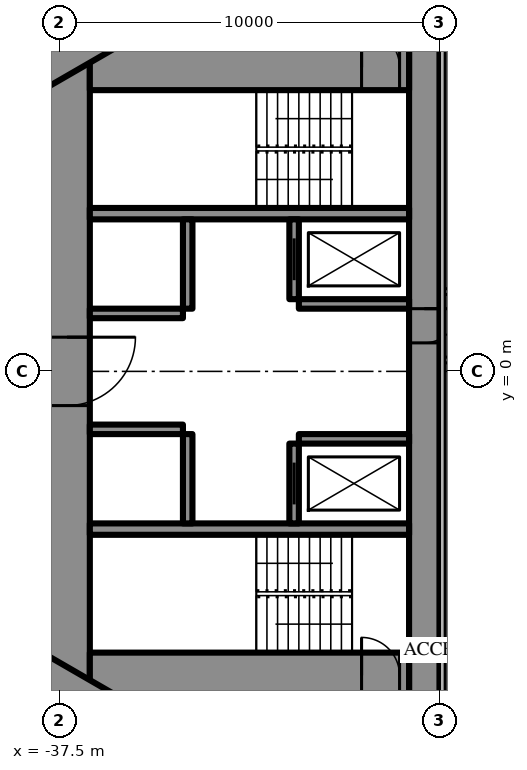
"""IFC4 building model, lengths in metres.
Left out: names, types, materials, properties, quantities, classifications, styles, units other than length and angle.
Written with IfcOpenShell. Run it as: python <this file> out.ifc"""

import sys

from ifc_helpers import new_model, si_unit, direction, frame, frame_2d, origin, place, context, subcontext, project, spatial, rectangle, extrude, element, fill, save


model = new_model("IFC4")
c1 = context("Model", 3, precision=1e-05, world=origin(), true_north=direction((0.0, 1.0)))
c2 = subcontext(c1, "Body", "Model", "MODEL_VIEW")
j1 = project(units=[si_unit("LENGTHUNIT", "METRE"), si_unit("PLANEANGLEUNIT", "RADIAN")], contexts=[c1])
p1 = place(None, origin())
s1 = spatial("IfcSite", under=j1, at=p1, CompositionType="ELEMENT")
p2 = place(p1, origin())
s2 = spatial("IfcBuilding", under=s1, at=p2, CompositionType="ELEMENT")
p3 = place(p2, frame((0.0, 0.0, 222.5)))
s3 = spatial("IfcBuildingStorey", under=s2, at=p3, CompositionType="ELEMENT", Elevation=222.5)
p4 = place(p3, frame((-27.9, 8.6, 0.0), z_axis=(0.0, 0.0, 1.0), x_axis=(0.0, -1.0, 0.0)))
e1 = element("IfcWall", 1, at=p4, inside=s3, PredefinedType="SHEAR", context=c2, shape_type="SweptSolid", body=[
    extrude(rectangle(XDim=17.2, YDim=0.8, at=frame_2d((8.6, 0.0))), origin(), (0.0, 0.0, 1.0), 3.6),
])
p5 = place(p4, frame((6.95, 0.0, 0.0)))
e2 = element("IfcOpeningElement", 2, at=p5, cuts=e1, PredefinedType="OPENING", context=c2, shape_type="SweptSolid", body=[
    extrude(rectangle(XDim=0.9, YDim=2.2, at=frame_2d((0.45, 1.1))), frame((0.0, 0.41, 0.0), z_axis=(0.0, -1.0, 0.0), x_axis=(1.0, 0.0, 0.0)), (0.0, 0.0, 1.0), 0.82),
])
p6 = place(p3, frame((-37.3, 8.6, 0.0), z_axis=(0.0, 0.0, 1.0), x_axis=(0.0, -1.0, 0.0)))
e3 = element("IfcWall", 3, at=p6, inside=s3, PredefinedType="SHEAR", context=c2, shape_type="SweptSolid", body=[
    extrude(rectangle(XDim=17.2, YDim=1.2, at=frame_2d((8.6, 0.0))), origin(), (0.0, 0.0, 1.0), 3.6),
])
p7 = place(p6, frame((7.7, 0.0, 0.0)))
e4 = element("IfcOpeningElement", 4, at=p7, cuts=e3, PredefinedType="OPENING", context=c2, shape_type="SweptSolid", body=[
    extrude(rectangle(XDim=1.8, YDim=2.2, at=frame_2d((0.9, 1.1))), frame((0.0, 0.61, 0.0), z_axis=(0.0, -1.0, 0.0), x_axis=(1.0, 0.0, 0.0)), (0.0, 0.0, 1.0), 1.22),
])
p8 = place(p3, frame((-28.3, 8.0, 0.0), z_axis=(0.0, 0.0, 1.0), x_axis=(-1.0, 0.0, 0.0)))
e5 = element("IfcWall", 5, at=p8, inside=s3, PredefinedType="SHEAR", context=c2, shape_type="SweptSolid", body=[
    extrude(rectangle(XDim=8.4, YDim=1.2, at=frame_2d((4.2, 0.0))), origin(), (0.0, 0.0, 1.0), 3.6),
])
p9 = place(p8, frame((0.25, 0.0, 0.0)))
e6 = element("IfcOpeningElement", 6, at=p9, cuts=e5, PredefinedType="OPENING", context=c2, shape_type="SweptSolid", body=[
    extrude(rectangle(XDim=1.0, YDim=2.2, at=frame_2d((0.5, 1.1))), frame((0.0, 0.61, 0.0), z_axis=(0.0, -1.0, 0.0), x_axis=(1.0, 0.0, 0.0)), (0.0, 0.0, 1.0), 1.22),
])
p10 = place(p3, frame((-28.3, -8.0, 0.0), z_axis=(0.0, 0.0, 1.0), x_axis=(-1.0, 0.0, 0.0)))
e7 = element("IfcWall", 7, at=p10, inside=s3, PredefinedType="SHEAR", context=c2, shape_type="SweptSolid", body=[
    extrude(rectangle(XDim=8.4, YDim=1.2, at=frame_2d((4.2, 0.0))), origin(), (0.0, 0.0, 1.0), 3.6),
])
p11 = place(p10, frame((0.25, 0.0, 0.0)))
e8 = element("IfcOpeningElement", 8, at=p11, cuts=e7, PredefinedType="OPENING", context=c2, shape_type="SweptSolid", body=[
    extrude(rectangle(XDim=1.0, YDim=2.2, at=frame_2d((0.5, 1.1))), frame((0.0, 0.61, 0.0), z_axis=(0.0, -1.0, 0.0), x_axis=(1.0, 0.0, 0.0)), (0.0, 0.0, 1.0), 1.22),
])
for number, where, z_axis, x_axis in (
    (9, (-28.3, 4.15, 0.0), (0.0, 0.0, 1.0), (-1.0, 0.0, 0.0)),
    (10, (-28.3, -4.15, 0.0), (0.0, 0.0, 1.0), (-1.0, 0.0, 0.0)),
):
    element("IfcWall", number, at=place(p3, frame(where, z_axis=z_axis, x_axis=x_axis)), inside=s3, PredefinedType="SHEAR", context=c2, shape_type="SweptSolid", body=[
        extrude(rectangle(XDim=8.4, YDim=0.3, at=frame_2d((4.2, 0.0))), origin(), (0.0, 0.0, 1.0), 3.6),
    ])
p12 = place(p3, frame((-31.325, 4.0, 0.0), z_axis=(0.0, 0.0, 1.0), x_axis=(0.0, -1.0, 0.0)))
e11 = element("IfcWall", 11, at=p12, inside=s3, PredefinedType="SHEAR", context=c2, shape_type="SweptSolid", body=[
    extrude(rectangle(XDim=2.1, YDim=0.25, at=frame_2d((1.05, 0.0))), origin(), (0.0, 0.0, 1.0), 3.6),
])
p13 = place(p12, frame((0.5, 0.0, 0.0)))
e12 = element("IfcOpeningElement", 12, at=p13, cuts=e11, PredefinedType="OPENING", context=c2, shape_type="SweptSolid", body=[
    extrude(rectangle(XDim=1.1, YDim=2.2, at=frame_2d((0.55, 1.1))), frame((0.0, 0.135, 0.0), z_axis=(0.0, -1.0, 0.0), x_axis=(1.0, 0.0, 0.0)), (0.0, 0.0, 1.0), 0.27),
])
p14 = place(p3, frame((-34.125, 4.0, 0.0), z_axis=(0.0, 0.0, 1.0), x_axis=(0.0, -1.0, 0.0)))
e13 = element("IfcWall", 13, at=p14, inside=s3, PredefinedType="SHEAR", context=c2, shape_type="SweptSolid", body=[
    extrude(rectangle(XDim=2.35, YDim=0.25, at=frame_2d((1.175, 0.0))), origin(), (0.0, 0.0, 1.0), 3.6),
])
p15 = place(p3, frame((-28.3, 1.775, 0.0), z_axis=(0.0, 0.0, 1.0), x_axis=(-1.0, 0.0, 0.0)))
e14 = element("IfcWall", 14, at=p15, inside=s3, PredefinedType="SHEAR", context=c2, shape_type="SweptSolid", body=[
    extrude(rectangle(XDim=2.9, YDim=0.25, at=frame_2d((1.45, 0.0))), origin(), (0.0, 0.0, 1.0), 3.6),
])
p16 = place(p3, frame((-34.25, 1.525, 0.0), z_axis=(0.0, 0.0, 1.0), x_axis=(-1.0, 0.0, 0.0)))
e15 = element("IfcWall", 15, at=p16, inside=s3, PredefinedType="SHEAR", context=c2, shape_type="SweptSolid", body=[
    extrude(rectangle(XDim=2.45, YDim=0.25, at=frame_2d((1.225, 0.0))), origin(), (0.0, 0.0, 1.0), 3.6),
])
p17 = place(p3, frame((-31.325, -1.9, 0.0), z_axis=(0.0, 0.0, 1.0), x_axis=(0.0, -1.0, 0.0)))
e16 = element("IfcWall", 16, at=p17, inside=s3, PredefinedType="SHEAR", context=c2, shape_type="SweptSolid", body=[
    extrude(rectangle(XDim=2.1, YDim=0.25, at=frame_2d((1.05, 0.0))), origin(), (0.0, 0.0, 1.0), 3.6),
])
p18 = place(p17, frame((0.5, 0.0, 0.0)))
e17 = element("IfcOpeningElement", 17, at=p18, cuts=e16, PredefinedType="OPENING", context=c2, shape_type="SweptSolid", body=[
    extrude(rectangle(XDim=1.1, YDim=2.2, at=frame_2d((0.55, 1.1))), frame((0.0, 0.135, 0.0), z_axis=(0.0, -1.0, 0.0), x_axis=(1.0, 0.0, 0.0)), (0.0, 0.0, 1.0), 0.27),
])
p19 = place(p3, frame((-34.125, -1.65, 0.0), z_axis=(0.0, 0.0, 1.0), x_axis=(0.0, -1.0, 0.0)))
e18 = element("IfcWall", 18, at=p19, inside=s3, PredefinedType="SHEAR", context=c2, shape_type="SweptSolid", body=[
    extrude(rectangle(XDim=2.35, YDim=0.25, at=frame_2d((1.175, 0.0))), origin(), (0.0, 0.0, 1.0), 3.6),
])
p20 = place(p3, frame((-28.3, -1.775, 0.0), z_axis=(0.0, 0.0, 1.0), x_axis=(-1.0, 0.0, 0.0)))
e19 = element("IfcWall", 19, at=p20, inside=s3, PredefinedType="SHEAR", context=c2, shape_type="SweptSolid", body=[
    extrude(rectangle(XDim=2.9, YDim=0.25, at=frame_2d((1.45, 0.0))), origin(), (0.0, 0.0, 1.0), 3.6),
])
p21 = place(p3, frame((-34.25, -1.525, 0.0), z_axis=(0.0, 0.0, 1.0), x_axis=(-1.0, 0.0, 0.0)))
e20 = element("IfcWall", 20, at=p21, inside=s3, PredefinedType="SHEAR", context=c2, shape_type="SweptSolid", body=[
    extrude(rectangle(XDim=2.45, YDim=0.25, at=frame_2d((1.225, 0.0))), origin(), (0.0, 0.0, 1.0), 3.6),
])
p22 = place(p3, frame((-27.2, 14.3, 0.0), z_axis=(0.0, 0.0, 1.0), x_axis=(-0.866026593062, -0.499997940104, 0.0)))
e21 = element("IfcWall", 21, at=p22, inside=s3, PredefinedType="SHEAR", context=c2, shape_type="SweptSolid", body=[
    extrude(rectangle(XDim=28.946, YDim=1.2, at=frame_2d((14.473, 0.0))), origin(), (0.0, 0.0, 1.0), 3.6),
])
p23 = place(p22, frame((4.6, 0.0, 0.0)))
e22 = element("IfcOpeningElement", 22, at=p23, cuts=e21, PredefinedType="OPENING", context=c2, shape_type="SweptSolid", body=[
    extrude(rectangle(XDim=1.0, YDim=2.2, at=frame_2d((0.5, 1.1))), frame((0.0, 0.61, 0.0), z_axis=(0.0, -1.0, 0.0), x_axis=(1.0, 0.0, 0.0)), (0.0, 0.0, 1.0), 1.22),
])
p24 = place(p22, frame((13.395, 0.0, 0.0)))
e23 = element("IfcOpeningElement", 23, at=p24, cuts=e21, PredefinedType="OPENING", context=c2, shape_type="SweptSolid", body=[
    extrude(rectangle(XDim=1.8, YDim=2.2, at=frame_2d((0.9, 1.1))), frame((0.0, 0.61, 0.0), z_axis=(0.0, -1.0, 0.0), x_axis=(1.0, 0.0, 0.0)), (0.0, 0.0, 1.0), 1.22),
])
p25 = place(p3, frame((-27.2, -14.3, 0.0), z_axis=(0.0, 0.0, 1.0), x_axis=(-0.866024021859, 0.500002393557, 0.0)))
e24 = element("IfcWall", 24, at=p25, inside=s3, PredefinedType="SHEAR", context=c2, shape_type="SweptSolid", body=[
    extrude(rectangle(XDim=27.907, YDim=1.2, at=frame_2d((13.954, 0.0))), origin(), (0.0, 0.0, 1.0), 3.6),
])
p26 = place(p25, frame((4.6, 0.0, 0.0)))
e25 = element("IfcOpeningElement", 25, at=p26, cuts=e24, PredefinedType="OPENING", context=c2, shape_type="SweptSolid", body=[
    extrude(rectangle(XDim=1.0, YDim=2.2, at=frame_2d((0.5, 1.1))), frame((0.0, 0.61, 0.0), z_axis=(0.0, -1.0, 0.0), x_axis=(1.0, 0.0, 0.0)), (0.0, 0.0, 1.0), 1.22),
])
p27 = place(p25, frame((13.395, 0.0, 0.0)))
e26 = element("IfcOpeningElement", 26, at=p27, cuts=e24, PredefinedType="OPENING", context=c2, shape_type="SweptSolid", body=[
    extrude(rectangle(XDim=1.8, YDim=2.2, at=frame_2d((0.9, 1.1))), frame((0.0, 0.61, 0.0), z_axis=(0.0, -1.0, 0.0), x_axis=(1.0, 0.0, 0.0)), (0.0, 0.0, 1.0), 1.22),
])
p28 = place(p3, frame((-28.737, 16.068, 0.0), z_axis=(0.0, 0.0, 1.0), x_axis=(-0.866026057212, -0.499998868229, 0.0)))
e27 = element("IfcWall", 27, at=p28, inside=s3, PredefinedType="PARTITIONING", context=c2, shape_type="SweptSolid", body=[
    extrude(rectangle(XDim=32.137, YDim=0.2, at=frame_2d((16.068, 0.0))), origin(), (0.0, 0.0, 1.0), 3.35),
])
p29 = place(p28, frame((1.08, 0.0, 0.0)))
e28 = element("IfcOpeningElement", 28, at=p29, cuts=e27, PredefinedType="OPENING", context=c2, shape_type="SweptSolid", body=[
    extrude(rectangle(XDim=1.8, YDim=2.03, at=frame_2d((0.9, 1.015))), frame((0.0, 0.11, 0.0), z_axis=(0.0, -1.0, 0.0), x_axis=(1.0, 0.0, 0.0)), (0.0, 0.0, 1.0), 0.22),
])
p30 = place(p28, frame((6.86, 0.0, 0.0)))
e29 = element("IfcOpeningElement", 29, at=p30, cuts=e27, PredefinedType="OPENING", context=c2, shape_type="SweptSolid", body=[
    extrude(rectangle(XDim=1.0, YDim=2.2, at=frame_2d((0.5, 1.1))), frame((0.0, 0.11, 0.0), z_axis=(0.0, -1.0, 0.0), x_axis=(1.0, 0.0, 0.0)), (0.0, 0.0, 1.0), 0.22),
])
p31 = place(p28, frame((16.418, 0.0, 0.0)))
e30 = element("IfcOpeningElement", 30, at=p31, cuts=e27, PredefinedType="OPENING", context=c2, shape_type="SweptSolid", body=[
    extrude(rectangle(XDim=0.95, YDim=2.2, at=frame_2d((0.475, 1.1))), frame((0.0, 0.11, 0.0), z_axis=(0.0, -1.0, 0.0), x_axis=(1.0, 0.0, 0.0)), (0.0, 0.0, 1.0), 0.22),
])
p32 = place(p28, frame((20.567, 0.0, 0.0)))
e31 = element("IfcOpeningElement", 31, at=p32, cuts=e27, PredefinedType="OPENING", context=c2, shape_type="SweptSolid", body=[
    extrude(rectangle(XDim=0.95, YDim=2.2, at=frame_2d((0.475, 1.1))), frame((0.0, 0.11, 0.0), z_axis=(0.0, -1.0, 0.0), x_axis=(1.0, 0.0, 0.0)), (0.0, 0.0, 1.0), 0.22),
])
p33 = place(p28, frame((27.065, 0.0, 0.0)))
e32 = element("IfcOpeningElement", 32, at=p33, cuts=e27, PredefinedType="OPENING", context=c2, shape_type="SweptSolid", body=[
    extrude(rectangle(XDim=0.95, YDim=2.2, at=frame_2d((0.475, 1.1))), frame((0.0, 0.11, 0.0), z_axis=(0.0, -1.0, 0.0), x_axis=(1.0, 0.0, 0.0)), (0.0, 0.0, 1.0), 0.22),
])
p34 = place(p3, frame((-27.5, 0.3, 0.0), z_axis=(0.0, 0.0, 1.0), x_axis=(1.0, 0.0, 0.0)))
e33 = element("IfcWall", 33, at=p34, inside=s3, PredefinedType="PARTITIONING", context=c2, shape_type="SweptSolid", body=[
    extrude(rectangle(XDim=55.0, YDim=0.15, at=frame_2d((27.5, 0.0))), origin(), (0.0, 0.0, 1.0), 2.4),
])
p35 = place(p34, frame((1.575, 0.0, 0.0)))
e34 = element("IfcOpeningElement", 34, at=p35, cuts=e33, PredefinedType="OPENING", context=c2, shape_type="SweptSolid", body=[
    extrude(rectangle(XDim=1.0, YDim=2.2, at=frame_2d((0.5, 1.1))), frame((0.0, 0.085, 0.0), z_axis=(0.0, -1.0, 0.0), x_axis=(1.0, 0.0, 0.0)), (0.0, 0.0, 1.0), 0.17),
])
p36 = place(p34, frame((8.525, 0.0, 0.0)))
e35 = element("IfcOpeningElement", 35, at=p36, cuts=e33, PredefinedType="OPENING", context=c2, shape_type="SweptSolid", body=[
    extrude(rectangle(XDim=1.05, YDim=2.4, at=frame_2d((0.525, 1.2))), frame((0.0, 0.085, 0.0), z_axis=(0.0, -1.0, 0.0), x_axis=(1.0, 0.0, 0.0)), (0.0, 0.0, 1.0), 0.17),
])
p37 = place(p34, frame((14.025, 0.0, 0.0)))
e36 = element("IfcOpeningElement", 36, at=p37, cuts=e33, PredefinedType="OPENING", context=c2, shape_type="SweptSolid", body=[
    extrude(rectangle(XDim=1.05, YDim=2.4, at=frame_2d((0.525, 1.2))), frame((0.0, 0.085, 0.0), z_axis=(0.0, -1.0, 0.0), x_axis=(1.0, 0.0, 0.0)), (0.0, 0.0, 1.0), 0.17),
])
p38 = place(p34, frame((19.525, 0.0, 0.0)))
e37 = element("IfcOpeningElement", 37, at=p38, cuts=e33, PredefinedType="OPENING", context=c2, shape_type="SweptSolid", body=[
    extrude(rectangle(XDim=1.05, YDim=2.4, at=frame_2d((0.525, 1.2))), frame((0.0, 0.085, 0.0), z_axis=(0.0, -1.0, 0.0), x_axis=(1.0, 0.0, 0.0)), (0.0, 0.0, 1.0), 0.17),
])
p39 = place(p34, frame((25.025, 0.0, 0.0)))
e38 = element("IfcOpeningElement", 38, at=p39, cuts=e33, PredefinedType="OPENING", context=c2, shape_type="SweptSolid", body=[
    extrude(rectangle(XDim=1.05, YDim=2.4, at=frame_2d((0.525, 1.2))), frame((0.0, 0.085, 0.0), z_axis=(0.0, -1.0, 0.0), x_axis=(1.0, 0.0, 0.0)), (0.0, 0.0, 1.0), 0.17),
])
p40 = place(p34, frame((30.525, 0.0, 0.0)))
e39 = element("IfcOpeningElement", 39, at=p40, cuts=e33, PredefinedType="OPENING", context=c2, shape_type="SweptSolid", body=[
    extrude(rectangle(XDim=1.05, YDim=2.4, at=frame_2d((0.525, 1.2))), frame((0.0, 0.085, 0.0), z_axis=(0.0, -1.0, 0.0), x_axis=(1.0, 0.0, 0.0)), (0.0, 0.0, 1.0), 0.17),
])
p41 = place(p34, frame((36.025, 0.0, 0.0)))
e40 = element("IfcOpeningElement", 40, at=p41, cuts=e33, PredefinedType="OPENING", context=c2, shape_type="SweptSolid", body=[
    extrude(rectangle(XDim=1.05, YDim=2.4, at=frame_2d((0.525, 1.2))), frame((0.0, 0.085, 0.0), z_axis=(0.0, -1.0, 0.0), x_axis=(1.0, 0.0, 0.0)), (0.0, 0.0, 1.0), 0.17),
])
p42 = place(p34, frame((41.525, 0.0, 0.0)))
e41 = element("IfcOpeningElement", 41, at=p42, cuts=e33, PredefinedType="OPENING", context=c2, shape_type="SweptSolid", body=[
    extrude(rectangle(XDim=1.05, YDim=2.4, at=frame_2d((0.525, 1.2))), frame((0.0, 0.085, 0.0), z_axis=(0.0, -1.0, 0.0), x_axis=(1.0, 0.0, 0.0)), (0.0, 0.0, 1.0), 0.17),
])
p43 = place(p34, frame((47.025, 0.0, 0.0)))
e42 = element("IfcOpeningElement", 42, at=p43, cuts=e33, PredefinedType="OPENING", context=c2, shape_type="SweptSolid", body=[
    extrude(rectangle(XDim=1.05, YDim=2.4, at=frame_2d((0.525, 1.2))), frame((0.0, 0.085, 0.0), z_axis=(0.0, -1.0, 0.0), x_axis=(1.0, 0.0, 0.0)), (0.0, 0.0, 1.0), 0.17),
])
p44 = place(p34, frame((52.525, 0.0, 0.0)))
e43 = element("IfcOpeningElement", 43, at=p44, cuts=e33, PredefinedType="OPENING", context=c2, shape_type="SweptSolid", body=[
    extrude(rectangle(XDim=1.05, YDim=2.4, at=frame_2d((0.525, 1.2))), frame((0.0, 0.085, 0.0), z_axis=(0.0, -1.0, 0.0), x_axis=(1.0, 0.0, 0.0)), (0.0, 0.0, 1.0), 0.17),
])
p45 = place(p3, frame((-27.5, 2.1, 0.0), z_axis=(0.0, 0.0, 1.0), x_axis=(1.0, 0.0, 0.0)))
e44 = element("IfcWall", 44, at=p45, inside=s3, PredefinedType="PARTITIONING", context=c2, shape_type="SweptSolid", body=[
    extrude(rectangle(XDim=55.0, YDim=0.15, at=frame_2d((27.5, 0.0))), origin(), (0.0, 0.0, 1.0), 3.4),
])
p46 = place(p45, frame((2.025, 0.0, 0.0)))
e45 = element("IfcOpeningElement", 45, at=p46, cuts=e44, PredefinedType="OPENING", context=c2, shape_type="SweptSolid", body=[
    extrude(rectangle(XDim=1.05, YDim=2.4, at=frame_2d((0.525, 1.2))), frame((0.0, 0.085, 0.0), z_axis=(0.0, -1.0, 0.0), x_axis=(1.0, 0.0, 0.0)), (0.0, 0.0, 1.0), 0.17),
])
p47 = place(p45, frame((8.525, 0.0, 0.0)))
e46 = element("IfcOpeningElement", 46, at=p47, cuts=e44, PredefinedType="OPENING", context=c2, shape_type="SweptSolid", body=[
    extrude(rectangle(XDim=1.05, YDim=2.4, at=frame_2d((0.525, 1.2))), frame((0.0, 0.085, 0.0), z_axis=(0.0, -1.0, 0.0), x_axis=(1.0, 0.0, 0.0)), (0.0, 0.0, 1.0), 0.17),
])
p48 = place(p45, frame((14.025, 0.0, 0.0)))
e47 = element("IfcOpeningElement", 47, at=p48, cuts=e44, PredefinedType="OPENING", context=c2, shape_type="SweptSolid", body=[
    extrude(rectangle(XDim=1.05, YDim=2.4, at=frame_2d((0.525, 1.2))), frame((0.0, 0.085, 0.0), z_axis=(0.0, -1.0, 0.0), x_axis=(1.0, 0.0, 0.0)), (0.0, 0.0, 1.0), 0.17),
])
p49 = place(p45, frame((19.525, 0.0, 0.0)))
e48 = element("IfcOpeningElement", 48, at=p49, cuts=e44, PredefinedType="OPENING", context=c2, shape_type="SweptSolid", body=[
    extrude(rectangle(XDim=1.05, YDim=2.4, at=frame_2d((0.525, 1.2))), frame((0.0, 0.085, 0.0), z_axis=(0.0, -1.0, 0.0), x_axis=(1.0, 0.0, 0.0)), (0.0, 0.0, 1.0), 0.17),
])
p50 = place(p45, frame((25.025, 0.0, 0.0)))
e49 = element("IfcOpeningElement", 49, at=p50, cuts=e44, PredefinedType="OPENING", context=c2, shape_type="SweptSolid", body=[
    extrude(rectangle(XDim=1.05, YDim=2.4, at=frame_2d((0.525, 1.2))), frame((0.0, 0.085, 0.0), z_axis=(0.0, -1.0, 0.0), x_axis=(1.0, 0.0, 0.0)), (0.0, 0.0, 1.0), 0.17),
])
p51 = place(p45, frame((30.525, 0.0, 0.0)))
e50 = element("IfcOpeningElement", 50, at=p51, cuts=e44, PredefinedType="OPENING", context=c2, shape_type="SweptSolid", body=[
    extrude(rectangle(XDim=1.05, YDim=2.4, at=frame_2d((0.525, 1.2))), frame((0.0, 0.085, 0.0), z_axis=(0.0, -1.0, 0.0), x_axis=(1.0, 0.0, 0.0)), (0.0, 0.0, 1.0), 0.17),
])
p52 = place(p45, frame((36.025, 0.0, 0.0)))
e51 = element("IfcOpeningElement", 51, at=p52, cuts=e44, PredefinedType="OPENING", context=c2, shape_type="SweptSolid", body=[
    extrude(rectangle(XDim=1.05, YDim=2.4, at=frame_2d((0.525, 1.2))), frame((0.0, 0.085, 0.0), z_axis=(0.0, -1.0, 0.0), x_axis=(1.0, 0.0, 0.0)), (0.0, 0.0, 1.0), 0.17),
])
p53 = place(p45, frame((41.525, 0.0, 0.0)))
e52 = element("IfcOpeningElement", 52, at=p53, cuts=e44, PredefinedType="OPENING", context=c2, shape_type="SweptSolid", body=[
    extrude(rectangle(XDim=1.05, YDim=2.4, at=frame_2d((0.525, 1.2))), frame((0.0, 0.085, 0.0), z_axis=(0.0, -1.0, 0.0), x_axis=(1.0, 0.0, 0.0)), (0.0, 0.0, 1.0), 0.17),
])
p54 = place(p45, frame((47.025, 0.0, 0.0)))
e53 = element("IfcOpeningElement", 53, at=p54, cuts=e44, PredefinedType="OPENING", context=c2, shape_type="SweptSolid", body=[
    extrude(rectangle(XDim=1.05, YDim=2.4, at=frame_2d((0.525, 1.2))), frame((0.0, 0.085, 0.0), z_axis=(0.0, -1.0, 0.0), x_axis=(1.0, 0.0, 0.0)), (0.0, 0.0, 1.0), 0.17),
])
p55 = place(p45, frame((52.525, 0.0, 0.0)))
e54 = element("IfcOpeningElement", 54, at=p55, cuts=e44, PredefinedType="OPENING", context=c2, shape_type="SweptSolid", body=[
    extrude(rectangle(XDim=1.05, YDim=2.4, at=frame_2d((0.525, 1.2))), frame((0.0, 0.085, 0.0), z_axis=(0.0, -1.0, 0.0), x_axis=(1.0, 0.0, 0.0)), (0.0, 0.0, 1.0), 0.17),
])
p56 = place(p7, origin())
e55 = element("IfcDoor", 55, at=p56, inside=s3, OperationType="DOUBLE_DOOR_SINGLE_SWING", PredefinedType="DOOR", context=c2, shape_type="SweptSolid", body=[
    extrude(rectangle(XDim=1.8, YDim=2.2, at=frame_2d((0.9, 1.1))), frame((0.0, 0.025, 0.0), z_axis=(0.0, -1.0, 0.0), x_axis=(1.0, 0.0, 0.0)), (0.0, 0.0, 1.0), 0.05),
])
fill(e4, e55)
p57 = place(p9, origin())
e56 = element("IfcDoor", 56, at=p57, inside=s3, OperationType="SINGLE_SWING_RIGHT", PredefinedType="DOOR", context=c2, shape_type="SweptSolid", body=[
    extrude(rectangle(XDim=1.0, YDim=2.2, at=frame_2d((0.5, 1.1))), frame((0.0, 0.025, 0.0), z_axis=(0.0, -1.0, 0.0), x_axis=(1.0, 0.0, 0.0)), (0.0, 0.0, 1.0), 0.05),
])
fill(e6, e56)
p58 = place(p11, origin())
e57 = element("IfcDoor", 57, at=p58, inside=s3, OperationType="SINGLE_SWING_RIGHT", PredefinedType="DOOR", context=c2, shape_type="SweptSolid", body=[
    extrude(rectangle(XDim=1.0, YDim=2.2, at=frame_2d((0.5, 1.1))), frame((0.0, 0.025, 0.0), z_axis=(0.0, -1.0, 0.0), x_axis=(1.0, 0.0, 0.0)), (0.0, 0.0, 1.0), 0.05),
])
fill(e8, e57)
p59 = place(p5, origin())
e58 = element("IfcDoor", 58, at=p59, inside=s3, OperationType="SINGLE_SWING_LEFT", PredefinedType="DOOR", context=c2, shape_type="SweptSolid", body=[
    extrude(rectangle(XDim=0.9, YDim=2.2, at=frame_2d((0.45, 1.1))), frame((0.0, 0.025, 0.0), z_axis=(0.0, -1.0, 0.0), x_axis=(1.0, 0.0, 0.0)), (0.0, 0.0, 1.0), 0.05),
])
fill(e2, e58)
p60 = place(p13, origin())
e59 = element("IfcDoor", 59, at=p60, inside=s3, OperationType="SLIDING_TO_LEFT", PredefinedType="USERDEFINED", context=c2, shape_type="SweptSolid", body=[
    extrude(rectangle(XDim=1.1, YDim=2.2, at=frame_2d((0.55, 1.1))), frame((0.0, 0.025, 0.0), z_axis=(0.0, -1.0, 0.0), x_axis=(1.0, 0.0, 0.0)), (0.0, 0.0, 1.0), 0.05),
])
fill(e12, e59)
p61 = place(p18, origin())
e60 = element("IfcDoor", 60, at=p61, inside=s3, OperationType="SLIDING_TO_LEFT", PredefinedType="USERDEFINED", context=c2, shape_type="SweptSolid", body=[
    extrude(rectangle(XDim=1.1, YDim=2.2, at=frame_2d((0.55, 1.1))), frame((0.0, 0.025, 0.0), z_axis=(0.0, -1.0, 0.0), x_axis=(1.0, 0.0, 0.0)), (0.0, 0.0, 1.0), 0.05),
])
fill(e17, e60)
save(model, sys.argv[1])
